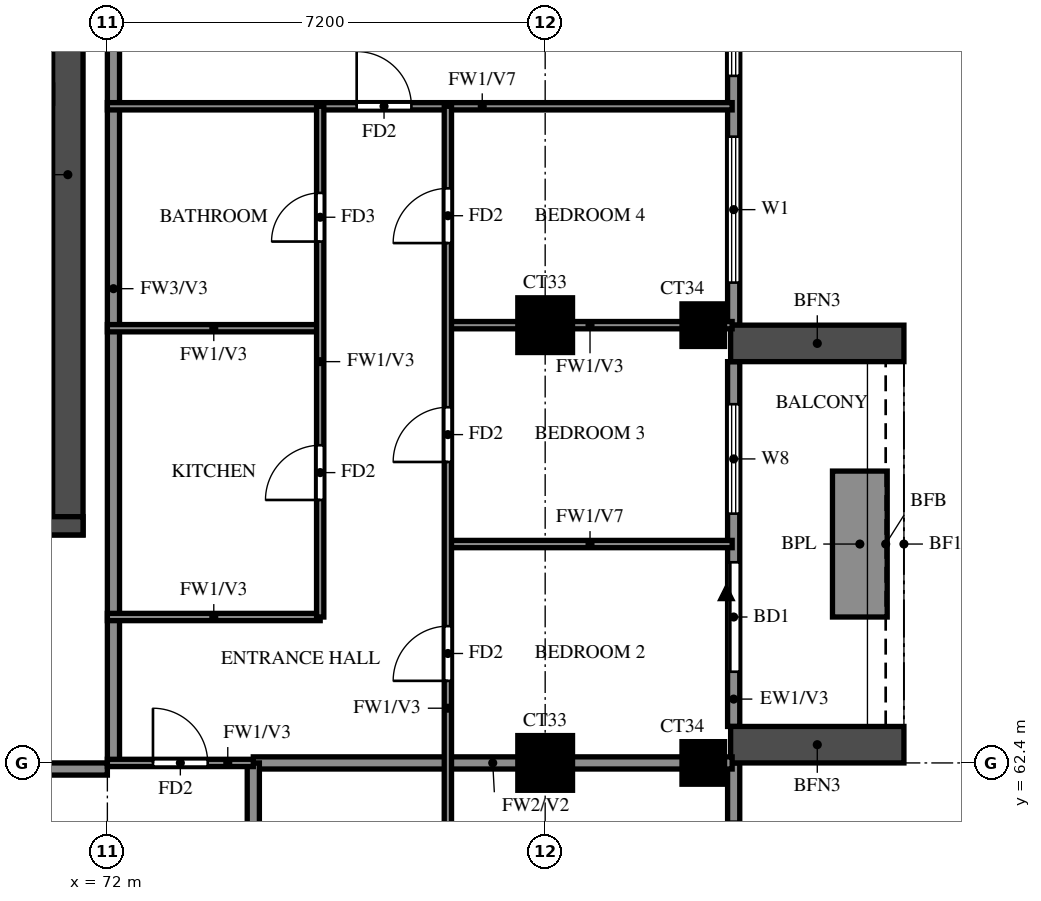
"""IFC4 building model, lengths in metres.
Left out: names, types, materials, properties, quantities, classifications, styles, units other than length and angle.
Written with IfcOpenShell. Run it as: python <this file> out.ifc"""

import sys

from ifc_helpers import new_model, si_unit, direction, frame, frame_2d, origin, origin_2d, place, context, subcontext, project, spatial, rectangle, extrude, source, transform, mapped, element, fill, save


model = new_model("IFC4")
c1 = context("Model", 3, precision=1e-05, world=origin(), true_north=direction((0.0, 1.0)))
c2 = subcontext(c1, "Body", "Model", "MODEL_VIEW")
j1 = project(units=[si_unit("LENGTHUNIT", "METRE"), si_unit("PLANEANGLEUNIT", "RADIAN")], contexts=[c1])
p1 = place(None, origin())
s1 = spatial("IfcSite", under=j1, at=p1, CompositionType="ELEMENT")
p2 = place(p1, origin())
s2 = spatial("IfcBuilding", under=s1, at=p2, CompositionType="ELEMENT")
p3 = place(p2, frame((0.0, 0.0, 229.0)))
s3 = spatial("IfcBuildingStorey", under=s2, at=p3, CompositionType="ELEMENT", Elevation=229.0)
m1 = source(origin(), c2, "Body", "SweptSolid", [
    extrude(rectangle(XDim=0.9, YDim=0.9, at=origin_2d()), origin(), (0.0, 0.0, 1.0), 3.22),
])
p4 = place(p3, frame((79.2, 62.4, 0.0), z_axis=(0.0, 0.0, 1.0), x_axis=(1.0, 0.0, 0.0)))
e1 = element("IfcColumn", 1, at=p4, inside=s3, PredefinedType="COLUMN", context=c2, shape_type="MappedRepresentation", body=[
    mapped(m1, transform((0.0, 0.0, 0.0))),
])
m2 = source(origin(), c2, "Body", "SweptSolid", [
    extrude(rectangle(XDim=0.7, YDim=0.7, at=origin_2d()), origin(), (0.0, 0.0, 1.0), 3.22),
])
p5 = place(p3, frame((81.8, 62.4, 0.0), z_axis=(0.0, 0.0, 1.0), x_axis=(1.0, 0.0, 0.0)))
e2 = element("IfcColumn", 2, at=p5, inside=s3, PredefinedType="COLUMN", context=c2, shape_type="MappedRepresentation", body=[
    mapped(m2, transform((0.0, 0.0, 0.0))),
])
p6 = place(p3, frame((79.2, 69.6, 0.0), z_axis=(0.0, 0.0, 1.0), x_axis=(1.0, 0.0, 0.0)))
e3 = element("IfcColumn", 3, at=p6, inside=s3, PredefinedType="COLUMN", context=c2, shape_type="MappedRepresentation", body=[
    mapped(m1, transform((0.0, 0.0, 0.0))),
])
p7 = place(p3, frame((81.8, 69.6, 0.0), z_axis=(0.0, 0.0, 1.0), x_axis=(1.0, 0.0, 0.0)))
e4 = element("IfcColumn", 4, at=p7, inside=s3, PredefinedType="COLUMN", context=c2, shape_type="MappedRepresentation", body=[
    mapped(m2, transform((0.0, 0.0, 0.0))),
])
p8 = place(p3, frame((71.35, 66.15, 0.0), z_axis=(0.0, 0.0, 1.0), x_axis=(0.0, 1.0, 0.0)))
e5 = element("IfcWall", 5, at=p8, inside=s3, PredefinedType="SHEAR", context=c2, shape_type="SweptSolid", body=[
    extrude(rectangle(XDim=11.85, YDim=0.5, at=frame_2d((5.925, 0.0))), origin(), (0.0, 0.0, 1.0), 3.22),
])
p9 = place(p3, frame((29.2, 66.3, 0.0), z_axis=(0.0, 0.0, 1.0), x_axis=(1.0, 0.0, 0.0)))
e6 = element("IfcWall", 6, at=p9, inside=s3, PredefinedType="SHEAR", context=c2, shape_type="SweptSolid", body=[
    extrude(rectangle(XDim=42.4, YDim=0.3, at=frame_2d((21.2, 0.0))), origin(), (0.0, 0.0, 1.0), 3.22),
])
p10 = place(p9, frame((1.425, 0.0, 0.0)))
e7 = element("IfcOpeningElement", 7, at=p10, cuts=e6, PredefinedType="OPENING", context=c2, shape_type="SweptSolid", body=[
    extrude(rectangle(XDim=1.1, YDim=2.1, at=frame_2d((0.55, 1.05))), frame((0.0, 0.16, 0.0), z_axis=(0.0, -1.0, 0.0), x_axis=(1.0, 0.0, 0.0)), (0.0, 0.0, 1.0), 0.32),
])
p11 = place(p9, frame((4.2, 0.0, 0.0)))
e8 = element("IfcOpeningElement", 8, at=p11, cuts=e6, PredefinedType="OPENING", context=c2, shape_type="SweptSolid", body=[
    extrude(rectangle(XDim=1.8, YDim=2.1, at=frame_2d((0.9, 1.05))), frame((0.0, 0.16, 0.0), z_axis=(0.0, -1.0, 0.0), x_axis=(1.0, 0.0, 0.0)), (0.0, 0.0, 1.0), 0.32),
])
p12 = place(p3, frame((82.3, 48.2, 0.0), z_axis=(0.0, 0.0, 1.0), x_axis=(0.0, 1.0, 0.0)))
e9 = element("IfcWall", 9, at=p12, inside=s3, PredefinedType="SOLIDWALL", context=c2, shape_type="SweptSolid", body=[
    extrude(rectangle(XDim=14.2, YDim=0.2, at=frame_2d((7.1, 0.0))), origin(), (0.0, 0.0, 1.0), 3.22),
])
p13 = place(p12, frame((0.6, 0.0, 0.6)))
e10 = element("IfcOpeningElement", 10, at=p13, cuts=e9, PredefinedType="OPENING", context=c2, shape_type="SweptSolid", body=[
    extrude(rectangle(XDim=2.4, YDim=2.4, at=frame_2d((1.2, 1.2))), frame((0.0, 0.11, 0.0), z_axis=(0.0, -1.0, 0.0), x_axis=(1.0, 0.0, 0.0)), (0.0, 0.0, 1.0), 0.22),
])
p14 = place(p12, frame((4.75, 0.0, 1.5)))
e11 = element("IfcOpeningElement", 11, at=p14, cuts=e9, PredefinedType="OPENING", context=c2, shape_type="SweptSolid", body=[
    extrude(rectangle(XDim=0.9, YDim=0.9, at=frame_2d((0.45, 0.45))), frame((0.0, 0.11, 0.0), z_axis=(0.0, -1.0, 0.0), x_axis=(1.0, 0.0, 0.0)), (0.0, 0.0, 1.0), 0.22),
])
p15 = place(p12, frame((7.767, 0.0, 0.6)))
e12 = element("IfcOpeningElement", 12, at=p15, cuts=e9, PredefinedType="OPENING", context=c2, shape_type="SweptSolid", body=[
    extrude(rectangle(XDim=2.4, YDim=2.4, at=frame_2d((1.2, 1.2))), frame((0.0, 0.11, 0.0), z_axis=(0.0, -1.0, 0.0), x_axis=(1.0, 0.0, 0.0)), (0.0, 0.0, 1.0), 0.22),
])
p16 = place(p12, frame((10.833, 0.0, 0.6)))
e13 = element("IfcOpeningElement", 13, at=p16, cuts=e9, PredefinedType="OPENING", context=c2, shape_type="SweptSolid", body=[
    extrude(rectangle(XDim=2.4, YDim=2.4, at=frame_2d((1.2, 1.2))), frame((0.0, 0.11, 0.0), z_axis=(0.0, -1.0, 0.0), x_axis=(1.0, 0.0, 0.0)), (0.0, 0.0, 1.0), 0.22),
])
p17 = place(p3, frame((82.3, 63.0, 0.0), z_axis=(0.0, 0.0, 1.0), x_axis=(0.0, 1.0, 0.0)))
e14 = element("IfcWall", 14, at=p17, inside=s3, PredefinedType="SOLIDWALL", context=c2, shape_type="SweptSolid", body=[
    extrude(rectangle(XDim=6.0, YDim=0.2, at=frame_2d((3.0, 0.0))), origin(), (0.0, 0.0, 1.0), 3.22),
])
p18 = place(p17, frame((0.9, 0.0, 0.0)))
e15 = element("IfcOpeningElement", 15, at=p18, cuts=e14, PredefinedType="OPENING", context=c2, shape_type="SweptSolid", body=[
    extrude(rectangle(XDim=1.8, YDim=2.4, at=frame_2d((0.9, 1.2))), frame((0.0, 0.11, 0.0), z_axis=(0.0, -1.0, 0.0), x_axis=(1.0, 0.0, 0.0)), (0.0, 0.0, 1.0), 0.22),
])
p19 = place(p17, frame((3.5, 0.0, 0.6)))
e16 = element("IfcOpeningElement", 16, at=p19, cuts=e14, PredefinedType="OPENING", context=c2, shape_type="SweptSolid", body=[
    extrude(rectangle(XDim=1.8, YDim=2.4, at=frame_2d((0.9, 1.2))), frame((0.0, 0.11, 0.0), z_axis=(0.0, -1.0, 0.0), x_axis=(1.0, 0.0, 0.0)), (0.0, 0.0, 1.0), 0.22),
])
p20 = place(p3, frame((82.3, 69.6, 0.0), z_axis=(0.0, 0.0, 1.0), x_axis=(0.0, 1.0, 0.0)))
e17 = element("IfcWall", 17, at=p20, inside=s3, PredefinedType="SOLIDWALL", context=c2, shape_type="SweptSolid", body=[
    extrude(rectangle(XDim=7.2, YDim=0.2, at=frame_2d((3.6, 0.0))), origin(), (0.0, 0.0, 1.0), 3.22),
])
p21 = place(p20, frame((0.7, 0.0, 0.6)))
e18 = element("IfcOpeningElement", 18, at=p21, cuts=e17, PredefinedType="OPENING", context=c2, shape_type="SweptSolid", body=[
    extrude(rectangle(XDim=2.4, YDim=2.4, at=frame_2d((1.2, 1.2))), frame((0.0, 0.11, 0.0), z_axis=(0.0, -1.0, 0.0), x_axis=(1.0, 0.0, 0.0)), (0.0, 0.0, 1.0), 0.22),
])
p22 = place(p20, frame((4.1, 0.0, 0.6)))
e19 = element("IfcOpeningElement", 19, at=p22, cuts=e17, PredefinedType="OPENING", context=c2, shape_type="SweptSolid", body=[
    extrude(rectangle(XDim=2.4, YDim=2.4, at=frame_2d((1.2, 1.2))), frame((0.0, 0.11, 0.0), z_axis=(0.0, -1.0, 0.0), x_axis=(1.0, 0.0, 0.0)), (0.0, 0.0, 1.0), 0.22),
])
for number, where, z_axis, x_axis in (
    (20, (82.25, 62.7, 0.0), (0.0, 0.0, 1.0), (1.0, 0.0, 0.0)),
    (21, (82.25, 69.3, 0.0), (0.0, 0.0, 1.0), (1.0, 0.0, 0.0)),
):
    element("IfcWall", number, at=place(p3, frame(where, z_axis=z_axis, x_axis=x_axis)), inside=s3, PredefinedType="SOLIDWALL", context=c2, shape_type="SweptSolid", body=[
        extrude(rectangle(XDim=2.85, YDim=0.6, at=frame_2d((1.425, 0.0))), origin(), (0.0, 0.0, 1.0), 2.85),
    ])
p23 = place(p3, frame((84.375, 64.8, 0.0), z_axis=(0.0, 0.0, 1.0), x_axis=(0.0, 1.0, 0.0)))
e22 = element("IfcWall", 22, at=p23, inside=s3, PredefinedType="SOLIDWALL", context=c2, shape_type="SweptSolid", body=[
    extrude(rectangle(XDim=2.4, YDim=0.9, at=frame_2d((1.2, 0.0))), origin(), (0.0, 0.0, 1.0), 0.9),
])
p24 = place(p3, frame((67.2, 62.3, 0.0), z_axis=(0.0, 0.0, 1.0), x_axis=(1.0, 0.0, 0.0)))
e23 = element("IfcWall", 23, at=p24, inside=s3, PredefinedType="SOLIDWALL", context=c2, shape_type="SweptSolid", body=[
    extrude(rectangle(XDim=4.8, YDim=0.2, at=frame_2d((2.4, 0.0))), origin(), (0.0, 0.0, 1.0), 3.22),
])
p25 = place(p3, frame((72.1, 62.4, 0.0), z_axis=(0.0, 0.0, 1.0), x_axis=(0.0, 1.0, 0.0)))
e24 = element("IfcWall", 24, at=p25, inside=s3, PredefinedType="SOLIDWALL", context=c2, shape_type="SweptSolid", body=[
    extrude(rectangle(XDim=15.6, YDim=0.2, at=frame_2d((7.8, 0.0))), origin(), (0.0, 0.0, 1.0), 3.22),
])
p26 = place(p3, frame((74.4, 62.4, 0.0), z_axis=(0.0, 0.0, 1.0), x_axis=(1.0, 0.0, 0.0)))
e25 = element("IfcWall", 25, at=p26, inside=s3, PredefinedType="SOLIDWALL", context=c2, shape_type="SweptSolid", body=[
    extrude(rectangle(XDim=7.875, YDim=0.2, at=frame_2d((3.938, 0.0))), origin(), (0.0, 0.0, 1.0), 3.22),
])
p27 = place(p3, frame((74.4, 60.0, 0.0), z_axis=(0.0, 0.0, 1.0), x_axis=(0.0, 1.0, 0.0)))
e26 = element("IfcWall", 26, at=p27, inside=s3, PredefinedType="SOLIDWALL", context=c2, shape_type="SweptSolid", body=[
    extrude(rectangle(XDim=2.4, YDim=0.2, at=frame_2d((1.2, 0.0))), origin(), (0.0, 0.0, 1.0), 3.22),
])
p28 = place(p3, frame((72.0, 62.4, 0.0), z_axis=(0.0, 0.0, 1.0), x_axis=(1.0, 0.0, 0.0)))
e27 = element("IfcWall", 27, at=p28, inside=s3, PredefinedType="PARTITIONING", context=c2, shape_type="SweptSolid", body=[
    extrude(rectangle(XDim=2.4, YDim=0.12, at=frame_2d((1.2, 0.0))), origin(), (0.0, 0.0, 1.0), 3.22),
])
p29 = place(p28, frame((0.75, 0.0, 0.0)))
e28 = element("IfcOpeningElement", 28, at=p29, cuts=e27, PredefinedType="OPENING", context=c2, shape_type="SweptSolid", body=[
    extrude(rectangle(XDim=0.9, YDim=2.1, at=frame_2d((0.45, 1.05))), frame((0.0, 0.07, 0.0), z_axis=(0.0, -1.0, 0.0), x_axis=(1.0, 0.0, 0.0)), (0.0, 0.0, 1.0), 0.14),
])
p30 = place(p3, frame((72.0, 64.8, 0.0), z_axis=(0.0, 0.0, 1.0), x_axis=(1.0, 0.0, 0.0)))
e29 = element("IfcWall", 29, at=p30, inside=s3, PredefinedType="PARTITIONING", context=c2, shape_type="SweptSolid", body=[
    extrude(rectangle(XDim=3.5, YDim=0.12, at=frame_2d((1.75, 0.0))), origin(), (0.0, 0.0, 1.0), 3.22),
])
p31 = place(p3, frame((77.6, 66.0, 0.0), z_axis=(0.0, 0.0, 1.0), x_axis=(1.0, 0.0, 0.0)))
e30 = element("IfcWall", 30, at=p31, inside=s3, PredefinedType="PARTITIONING", context=c2, shape_type="SweptSolid", body=[
    extrude(rectangle(XDim=4.675, YDim=0.12, at=frame_2d((2.337, 0.0))), origin(), (0.0, 0.0, 1.0), 2.32),
])
p32 = place(p3, frame((72.0, 69.55, 0.0), z_axis=(0.0, 0.0, 1.0), x_axis=(1.0, 0.0, 0.0)))
e31 = element("IfcWall", 31, at=p32, inside=s3, PredefinedType="PARTITIONING", context=c2, shape_type="SweptSolid", body=[
    extrude(rectangle(XDim=3.5, YDim=0.12, at=frame_2d((1.75, 0.0))), origin(), (0.0, 0.0, 1.0), 3.22),
])
p33 = place(p3, frame((77.6, 69.6, 0.0), z_axis=(0.0, 0.0, 1.0), x_axis=(1.0, 0.0, 0.0)))
e32 = element("IfcWall", 32, at=p33, inside=s3, PredefinedType="PARTITIONING", context=c2, shape_type="SweptSolid", body=[
    extrude(rectangle(XDim=4.675, YDim=0.12, at=frame_2d((2.337, 0.0))), origin(), (0.0, 0.0, 1.0), 3.22),
])
p34 = place(p3, frame((72.0, 73.2, 0.0), z_axis=(0.0, 0.0, 1.0), x_axis=(1.0, 0.0, 0.0)))
e33 = element("IfcWall", 33, at=p34, inside=s3, PredefinedType="PARTITIONING", context=c2, shape_type="SweptSolid", body=[
    extrude(rectangle(XDim=10.275, YDim=0.12, at=frame_2d((5.137, 0.0))), origin(), (0.0, 0.0, 1.0), 2.32),
])
p35 = place(p34, frame((4.1, 0.0, 0.0)))
e34 = element("IfcOpeningElement", 34, at=p35, cuts=e33, PredefinedType="OPENING", context=c2, shape_type="SweptSolid", body=[
    extrude(rectangle(XDim=0.9, YDim=2.1, at=frame_2d((0.45, 1.05))), frame((0.0, 0.07, 0.0), z_axis=(0.0, -1.0, 0.0), x_axis=(1.0, 0.0, 0.0)), (0.0, 0.0, 1.0), 0.14),
])
p36 = place(p3, frame((75.5, 64.8, 0.0), z_axis=(0.0, 0.0, 1.0), x_axis=(0.0, 1.0, 0.0)))
e35 = element("IfcWall", 35, at=p36, inside=s3, PredefinedType="PARTITIONING", context=c2, shape_type="SweptSolid", body=[
    extrude(rectangle(XDim=8.4, YDim=0.12, at=frame_2d((4.2, 0.0))), origin(), (0.0, 0.0, 1.0), 3.22),
])
p37 = place(p36, frame((1.925, 0.0, 0.0)))
e36 = element("IfcOpeningElement", 36, at=p37, cuts=e35, PredefinedType="OPENING", context=c2, shape_type="SweptSolid", body=[
    extrude(rectangle(XDim=0.9, YDim=2.1, at=frame_2d((0.45, 1.05))), frame((0.0, 0.07, 0.0), z_axis=(0.0, -1.0, 0.0), x_axis=(1.0, 0.0, 0.0)), (0.0, 0.0, 1.0), 0.14),
])
p38 = place(p36, frame((6.175, 0.0, 0.0)))
e37 = element("IfcOpeningElement", 37, at=p38, cuts=e35, PredefinedType="OPENING", context=c2, shape_type="SweptSolid", body=[
    extrude(rectangle(XDim=0.8, YDim=2.1, at=frame_2d((0.4, 1.05))), frame((0.0, 0.07, 0.0), z_axis=(0.0, -1.0, 0.0), x_axis=(1.0, 0.0, 0.0)), (0.0, 0.0, 1.0), 0.14),
])
p39 = place(p3, frame((77.6, 55.2, 0.0), z_axis=(0.0, 0.0, 1.0), x_axis=(0.0, 1.0, 0.0)))
e38 = element("IfcWall", 38, at=p39, inside=s3, PredefinedType="PARTITIONING", context=c2, shape_type="SweptSolid", body=[
    extrude(rectangle(XDim=18.0, YDim=0.12, at=frame_2d((9.0, 0.0))), origin(), (0.0, 0.0, 1.0), 3.22),
])
p40 = place(p39, frame((2.85, 0.0, 0.0)))
e39 = element("IfcOpeningElement", 39, at=p40, cuts=e38, PredefinedType="OPENING", context=c2, shape_type="SweptSolid", body=[
    extrude(rectangle(XDim=1.5, YDim=2.1, at=frame_2d((0.75, 1.05))), frame((0.0, 0.07, 0.0), z_axis=(0.0, -1.0, 0.0), x_axis=(1.0, 0.0, 0.0)), (0.0, 0.0, 1.0), 0.14),
])
p41 = place(p39, frame((8.55, 0.0, 0.0)))
e40 = element("IfcOpeningElement", 40, at=p41, cuts=e38, PredefinedType="OPENING", context=c2, shape_type="SweptSolid", body=[
    extrude(rectangle(XDim=0.9, YDim=2.1, at=frame_2d((0.45, 1.05))), frame((0.0, 0.07, 0.0), z_axis=(0.0, -1.0, 0.0), x_axis=(1.0, 0.0, 0.0)), (0.0, 0.0, 1.0), 0.14),
])
p42 = place(p39, frame((12.15, 0.0, 0.0)))
e41 = element("IfcOpeningElement", 41, at=p42, cuts=e38, PredefinedType="OPENING", context=c2, shape_type="SweptSolid", body=[
    extrude(rectangle(XDim=0.9, YDim=2.1, at=frame_2d((0.45, 1.05))), frame((0.0, 0.07, 0.0), z_axis=(0.0, -1.0, 0.0), x_axis=(1.0, 0.0, 0.0)), (0.0, 0.0, 1.0), 0.14),
])
p43 = place(p39, frame((15.75, 0.0, 0.0)))
e42 = element("IfcOpeningElement", 42, at=p43, cuts=e38, PredefinedType="OPENING", context=c2, shape_type="SweptSolid", body=[
    extrude(rectangle(XDim=0.9, YDim=2.1, at=frame_2d((0.45, 1.05))), frame((0.0, 0.07, 0.0), z_axis=(0.0, -1.0, 0.0), x_axis=(1.0, 0.0, 0.0)), (0.0, 0.0, 1.0), 0.14),
])
p44 = place(p18, origin())
e43 = element("IfcDoor", 43, at=p44, inside=s3, OperationType="DOUBLE_DOOR_SLIDING", PredefinedType="DOOR", context=c2, shape_type="SweptSolid", body=[
    extrude(rectangle(XDim=1.8, YDim=2.4, at=frame_2d((0.9, 1.2))), frame((0.0, 0.025, 0.0), z_axis=(0.0, -1.0, 0.0), x_axis=(1.0, 0.0, 0.0)), (0.0, 0.0, 1.0), 0.05),
])
fill(e15, e43)
p45 = place(p19, origin())
e44 = element("IfcWindow", 44, at=p45, inside=s3, PartitioningType="DOUBLE_PANEL_VERTICAL", PredefinedType="WINDOW", context=c2, shape_type="SweptSolid", body=[
    extrude(rectangle(XDim=1.8, YDim=2.4, at=frame_2d((0.9, 1.2))), frame((0.0, 0.03, 0.0), z_axis=(0.0, -1.0, 0.0), x_axis=(1.0, 0.0, 0.0)), (0.0, 0.0, 1.0), 0.06),
])
fill(e16, e44)
p46 = place(p21, origin())
e45 = element("IfcWindow", 45, at=p46, inside=s3, PartitioningType="DOUBLE_PANEL_VERTICAL", PredefinedType="WINDOW", context=c2, shape_type="SweptSolid", body=[
    extrude(rectangle(XDim=2.4, YDim=2.4, at=frame_2d((1.2, 1.2))), frame((0.0, 0.03, 0.0), z_axis=(0.0, -1.0, 0.0), x_axis=(1.0, 0.0, 0.0)), (0.0, 0.0, 1.0), 0.06),
])
fill(e18, e45)
p47 = place(p22, origin())
e46 = element("IfcWindow", 46, at=p47, inside=s3, PartitioningType="DOUBLE_PANEL_VERTICAL", PredefinedType="WINDOW", context=c2, shape_type="SweptSolid", body=[
    extrude(rectangle(XDim=2.4, YDim=2.4, at=frame_2d((1.2, 1.2))), frame((0.0, 0.03, 0.0), z_axis=(0.0, -1.0, 0.0), x_axis=(1.0, 0.0, 0.0)), (0.0, 0.0, 1.0), 0.06),
])
fill(e19, e46)
p48 = place(p29, origin())
e47 = element("IfcDoor", 47, at=p48, inside=s3, OperationType="SINGLE_SWING_LEFT", PredefinedType="DOOR", context=c2, shape_type="SweptSolid", body=[
    extrude(rectangle(XDim=0.9, YDim=2.1, at=frame_2d((0.45, 1.05))), frame((0.0, 0.025, 0.0), z_axis=(0.0, -1.0, 0.0), x_axis=(1.0, 0.0, 0.0)), (0.0, 0.0, 1.0), 0.05),
])
fill(e28, e47)
p49 = place(p41, origin())
e48 = element("IfcDoor", 48, at=p49, inside=s3, OperationType="SINGLE_SWING_LEFT", PredefinedType="DOOR", context=c2, shape_type="SweptSolid", body=[
    extrude(rectangle(XDim=0.9, YDim=2.1, at=frame_2d((0.45, 1.05))), frame((0.0, 0.025, 0.0), z_axis=(0.0, -1.0, 0.0), x_axis=(1.0, 0.0, 0.0)), (0.0, 0.0, 1.0), 0.05),
])
fill(e40, e48)
p50 = place(p42, origin())
e49 = element("IfcDoor", 49, at=p50, inside=s3, OperationType="SINGLE_SWING_LEFT", PredefinedType="DOOR", context=c2, shape_type="SweptSolid", body=[
    extrude(rectangle(XDim=0.9, YDim=2.1, at=frame_2d((0.45, 1.05))), frame((0.0, 0.025, 0.0), z_axis=(0.0, -1.0, 0.0), x_axis=(1.0, 0.0, 0.0)), (0.0, 0.0, 1.0), 0.05),
])
fill(e41, e49)
p51 = place(p43, origin())
e50 = element("IfcDoor", 50, at=p51, inside=s3, OperationType="SINGLE_SWING_RIGHT", PredefinedType="DOOR", context=c2, shape_type="SweptSolid", body=[
    extrude(rectangle(XDim=0.9, YDim=2.1, at=frame_2d((0.45, 1.05))), frame((0.0, 0.025, 0.0), z_axis=(0.0, -1.0, 0.0), x_axis=(1.0, 0.0, 0.0)), (0.0, 0.0, 1.0), 0.05),
])
fill(e42, e50)
p52 = place(p35, origin())
e51 = element("IfcDoor", 51, at=p52, inside=s3, OperationType="SINGLE_SWING_LEFT", PredefinedType="DOOR", context=c2, shape_type="SweptSolid", body=[
    extrude(rectangle(XDim=0.9, YDim=2.1, at=frame_2d((0.45, 1.05))), frame((0.0, 0.025, 0.0), z_axis=(0.0, -1.0, 0.0), x_axis=(1.0, 0.0, 0.0)), (0.0, 0.0, 1.0), 0.05),
])
fill(e34, e51)
p53 = place(p37, origin())
e52 = element("IfcDoor", 52, at=p53, inside=s3, OperationType="SINGLE_SWING_LEFT", PredefinedType="DOOR", context=c2, shape_type="SweptSolid", body=[
    extrude(rectangle(XDim=0.9, YDim=2.1, at=frame_2d((0.45, 1.05))), frame((0.0, 0.025, 0.0), z_axis=(0.0, -1.0, 0.0), x_axis=(1.0, 0.0, 0.0)), (0.0, 0.0, 1.0), 0.05),
])
fill(e36, e52)
p54 = place(p38, origin())
e53 = element("IfcDoor", 53, at=p54, inside=s3, OperationType="SINGLE_SWING_RIGHT", PredefinedType="DOOR", context=c2, shape_type="SweptSolid", body=[
    extrude(rectangle(XDim=0.8, YDim=2.1, at=frame_2d((0.4, 1.05))), frame((0.0, 0.025, 0.0), z_axis=(0.0, -1.0, 0.0), x_axis=(1.0, 0.0, 0.0)), (0.0, 0.0, 1.0), 0.05),
])
fill(e37, e53)
save(model, sys.argv[1])
